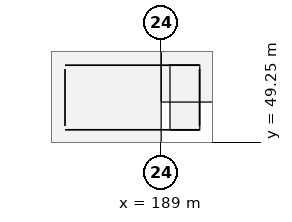
"""IFC4 building model, lengths in metres.
Left out: names, types, materials, properties, quantities, classifications, styles, units other than length and angle.
Written with IfcOpenShell. Run it as: python <this file> out.ifc"""

import sys

from ifc_helpers import new_model, si_unit, direction, frame, frame_2d, origin, place, context, subcontext, project, spatial, rectangle, extrude, element, fill, save


model = new_model("IFC4")
c1 = context("Model", 3, precision=1e-05, world=origin(), true_north=direction((0.0, 1.0)))
c2 = subcontext(c1, "Body", "Model", "MODEL_VIEW")
j1 = project(units=[si_unit("LENGTHUNIT", "METRE"), si_unit("PLANEANGLEUNIT", "RADIAN")], contexts=[c1])
p1 = place(None, origin())
s1 = spatial("IfcSite", under=j1, at=p1, CompositionType="ELEMENT")
p2 = place(p1, origin())
s2 = spatial("IfcBuilding", under=s1, at=p2, CompositionType="ELEMENT")
p3 = place(p2, origin())
s3 = spatial("IfcBuildingStorey", under=s2, at=p3, CompositionType="ELEMENT", Elevation=0.0)
for number, where, z_axis, x_axis in (
    (1, (182.675, 50.075, -0.5), (0.0, 0.0, 1.0), (1.0, 0.0, 0.0)),
    (2, (182.675, 54.325, -0.5), (0.0, 0.0, 1.0), (1.0, 0.0, 0.0)),
):
    element("IfcWall", number, at=place(p3, frame(where, z_axis=z_axis, x_axis=x_axis)), inside=s3, PredefinedType="SOLIDWALL", context=c2, shape_type="SweptSolid", body=[
        extrude(rectangle(XDim=8.85, YDim=0.25, at=frame_2d((4.425, 0.0))), origin(), (0.0, 0.0, 1.0), 6.8),
    ])
p4 = place(p3, frame((182.675, 50.325, -0.5), z_axis=(0.0, 0.0, 1.0), x_axis=(0.0, 1.0, 0.0)))
e3 = element("IfcWall", 3, at=p4, inside=s3, PredefinedType="SOLIDWALL", context=c2, shape_type="SweptSolid", body=[
    extrude(rectangle(XDim=3.75, YDim=0.25, at=frame_2d((1.875, 0.0))), origin(), (0.0, 0.0, 1.0), 6.8),
])
p5 = place(p4, frame((1.1, 0.0, 0.5)))
e4 = element("IfcOpeningElement", 4, at=p5, cuts=e3, PredefinedType="OPENING", context=c2, shape_type="SweptSolid", body=[
    extrude(rectangle(XDim=1.2, YDim=2.2, at=frame_2d((0.6, 1.1))), frame((0.0, 0.135, 0.0), z_axis=(0.0, -1.0, 0.0), x_axis=(1.0, 0.0, 0.0)), (0.0, 0.0, 1.0), 0.27),
])
p6 = place(p3, frame((191.525, 50.325, -0.5), z_axis=(0.0, 0.0, 1.0), x_axis=(0.0, 1.0, 0.0)))
e5 = element("IfcWall", 5, at=p6, inside=s3, PredefinedType="SOLIDWALL", context=c2, shape_type="SweptSolid", body=[
    extrude(rectangle(XDim=3.75, YDim=0.25, at=frame_2d((1.875, 0.0))), origin(), (0.0, 0.0, 1.0), 6.8),
])
p7 = place(p5, origin())
e6 = element("IfcDoor", 6, at=p7, inside=s3, OperationType="SINGLE_SWING_RIGHT", PredefinedType="DOOR", context=c2, shape_type="SweptSolid", body=[
    extrude(rectangle(XDim=1.2, YDim=2.2, at=frame_2d((0.6, 1.1))), frame((0.0, 0.025, 0.0), z_axis=(0.0, -1.0, 0.0), x_axis=(1.0, 0.0, 0.0)), (0.0, 0.0, 1.0), 0.05),
])
fill(e4, e6)
save(model, sys.argv[1])
